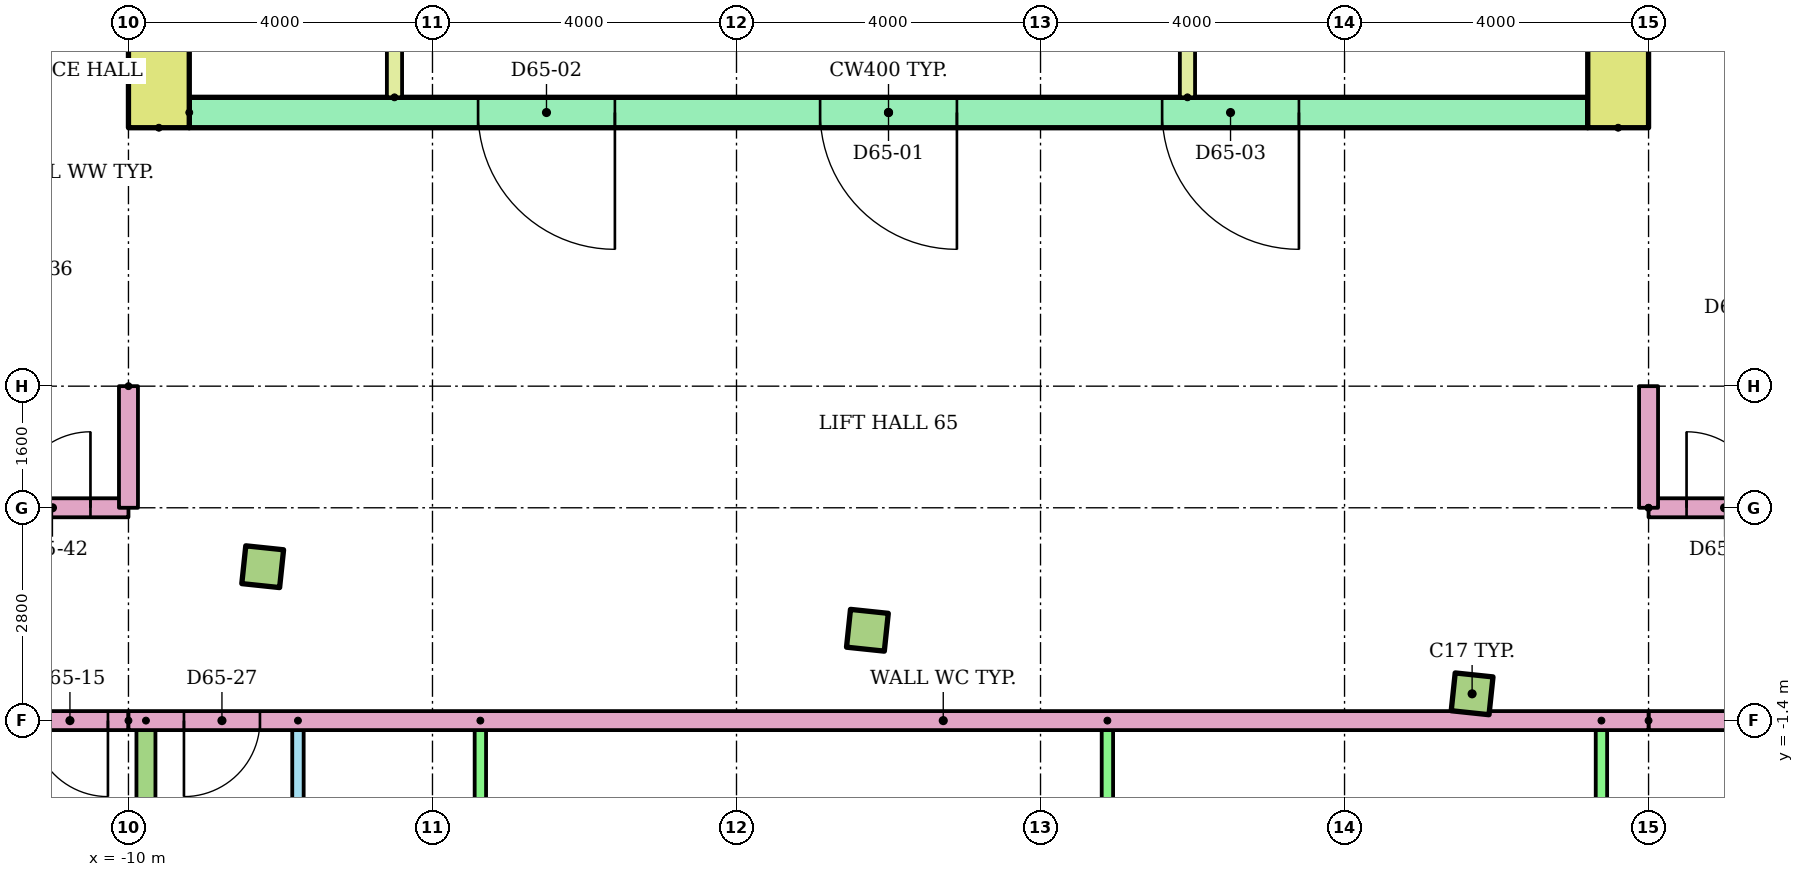
"""IFC4 building model, lengths in metres.
Left out: names, types, materials, properties, quantities, classifications, styles, units other than length and angle.
Written with IfcOpenShell. Run it as: python <this file> out.ifc"""

import sys

from ifc_helpers import new_model, si_unit, direction, frame, frame_2d, origin, origin_2d, place, context, subcontext, project, spatial, rectangle, extrude, element, fill, save


model = new_model("IFC4")
c1 = context("Model", 3, precision=1e-05, world=origin(), true_north=direction((0.0, 1.0)))
c2 = subcontext(c1, "Body", "Model", "MODEL_VIEW")
j1 = project(units=[si_unit("LENGTHUNIT", "METRE"), si_unit("PLANEANGLEUNIT", "RADIAN")], contexts=[c1])
p1 = place(None, origin())
s1 = spatial("IfcSite", under=j1, at=p1, CompositionType="ELEMENT")
p2 = place(p1, origin())
s2 = spatial("IfcBuilding", under=s1, at=p2, CompositionType="ELEMENT")
p3 = place(p2, frame((0.0, 0.0, 253.1)))
s3 = spatial("IfcBuildingStorey", under=s2, at=p3, CompositionType="ELEMENT", Elevation=253.1)
for number, where, z_axis, x_axis in (
    (1, (-8.234, 0.625, 0.0), (0.0, 0.0, 1.0), (0.995, -0.105, 0.0)),
    (2, (-0.278, -0.211, 0.0), (0.0, 0.0, 1.0), (0.995, -0.105, 0.0)),
    (3, (7.678, -1.048, 0.0), (0.0, 0.0, 1.0), (0.995, -0.105, 0.0)),
):
    element("IfcColumn", number, at=place(p3, frame(where, z_axis=z_axis, x_axis=x_axis)), inside=s3, PredefinedType="COLUMN", context=c2, shape_type="SweptSolid", body=[
        extrude(rectangle(XDim=0.5, YDim=0.5, at=origin_2d()), origin(), (0.0, 0.0, 1.0), 3.2),
    ])
for number, where, z_axis, x_axis in (
    (4, (-9.6, 6.4, 0.0), (0.0, 0.0, 1.0), (0.0, 1.0, 0.0)),
    (5, (9.6, 6.4, 0.0), (0.0, 0.0, 1.0), (0.0, 1.0, 0.0)),
):
    element("IfcWall", number, at=place(p3, frame(where, z_axis=z_axis, x_axis=x_axis)), inside=s3, PredefinedType="SHEAR", context=c2, shape_type="SweptSolid", body=[
        extrude(rectangle(XDim=13.6, YDim=0.8, at=frame_2d((6.8, 0.0))), origin(), (0.0, 0.0, 1.0), 2.92),
    ])
p4 = place(p3, frame((-9.2, 6.6, 0.0)))
e6 = element("IfcWall", 6, at=p4, inside=s3, PredefinedType="SHEAR", context=c2, shape_type="SweptSolid", body=[
    extrude(rectangle(XDim=18.4, YDim=0.4, at=frame_2d((9.2, 0.0))), origin(), (0.0, 0.0, 1.0), 2.92),
])
p5 = place(p4, frame((8.3, 0.0, 0.0)))
e7 = element("IfcOpeningElement", 7, at=p5, cuts=e6, PredefinedType="OPENING", context=c2, shape_type="SweptSolid", body=[
    extrude(rectangle(XDim=1.8, YDim=2.1, at=frame_2d((0.9, 1.05))), frame((0.0, 0.21, 0.0), z_axis=(0.0, -1.0, 0.0), x_axis=(1.0, 0.0, 0.0)), (0.0, 0.0, 1.0), 0.42),
])
p6 = place(p4, frame((3.8, 0.0, 0.0)))
e8 = element("IfcOpeningElement", 8, at=p6, cuts=e6, PredefinedType="OPENING", context=c2, shape_type="SweptSolid", body=[
    extrude(rectangle(XDim=1.8, YDim=2.1, at=frame_2d((0.9, 1.05))), frame((0.0, 0.21, 0.0), z_axis=(0.0, -1.0, 0.0), x_axis=(1.0, 0.0, 0.0)), (0.0, 0.0, 1.0), 0.42),
])
p7 = place(p4, frame((12.8, 0.0, 0.0)))
e9 = element("IfcOpeningElement", 9, at=p7, cuts=e6, PredefinedType="OPENING", context=c2, shape_type="SweptSolid", body=[
    extrude(rectangle(XDim=1.8, YDim=2.1, at=frame_2d((0.9, 1.05))), frame((0.0, 0.21, 0.0), z_axis=(0.0, -1.0, 0.0), x_axis=(1.0, 0.0, 0.0)), (0.0, 0.0, 1.0), 0.42),
])
p8 = place(p3, frame((3.933, 6.8, 0.0), z_axis=(0.0, 0.0, 1.0), x_axis=(0.0, 1.0, 0.0)))
e10 = element("IfcWall", 10, at=p8, inside=s3, PredefinedType="PARTITIONING", context=c2, shape_type="SweptSolid", body=[
    extrude(rectangle(XDim=3.3, YDim=0.2, at=frame_2d((1.65, 0.0))), origin(), (0.0, 0.0, 1.0), 2.92),
])
p9 = place(p8, frame((1.1, 0.0, 0.0)))
e11 = element("IfcOpeningElement", 11, at=p9, cuts=e10, PredefinedType="OPENING", context=c2, shape_type="SweptSolid", body=[
    extrude(rectangle(XDim=1.1, YDim=2.1, at=frame_2d((0.55, 1.05))), frame((0.0, 0.11, 0.0), z_axis=(0.0, -1.0, 0.0), x_axis=(1.0, 0.0, 0.0)), (0.0, 0.0, 1.0), 0.22),
])
p10 = place(p3, frame((-6.5, 6.8, 0.0), z_axis=(0.0, 0.0, 1.0), x_axis=(0.0, 1.0, 0.0)))
e12 = element("IfcWall", 12, at=p10, inside=s3, PredefinedType="PARTITIONING", context=c2, shape_type="SweptSolid", body=[
    extrude(rectangle(XDim=3.3, YDim=0.2, at=frame_2d((1.65, 0.0))), origin(), (0.0, 0.0, 1.0), 2.92),
])
p11 = place(p10, frame((1.15, 0.0, 0.0)))
e13 = element("IfcOpeningElement", 13, at=p11, cuts=e12, PredefinedType="OPENING", context=c2, shape_type="SweptSolid", body=[
    extrude(rectangle(XDim=1.0, YDim=2.1, at=frame_2d((0.5, 1.05))), frame((0.0, 0.11, 0.0), z_axis=(0.0, -1.0, 0.0), x_axis=(1.0, 0.0, 0.0)), (0.0, 0.0, 1.0), 0.22),
])
p12 = place(p3, frame((-7.77, -1.4, 0.0), z_axis=(0.0, 0.0, 1.0), x_axis=(0.0, -1.0, 0.0)))
e14 = element("IfcWall", 14, at=p12, inside=s3, PredefinedType="PARTITIONING", context=c2, shape_type="SweptSolid", body=[
    extrude(rectangle(XDim=6.075, YDim=0.15, at=frame_2d((3.037, 0.0))), origin(), (0.0, 0.0, 1.0), 2.4),
])
p13 = place(p12, frame((1.175, 0.0, 0.0)))
e15 = element("IfcOpeningElement", 15, at=p13, cuts=e14, PredefinedType="OPENING", context=c2, shape_type="SweptSolid", body=[
    extrude(rectangle(XDim=0.9, YDim=2.1, at=frame_2d((0.45, 1.05))), frame((0.0, 0.085, 0.0), z_axis=(0.0, -1.0, 0.0), x_axis=(1.0, 0.0, 0.0)), (0.0, 0.0, 1.0), 0.17),
])
p14 = place(p12, frame((4.13, 0.0, 0.0)))
e16 = element("IfcOpeningElement", 16, at=p14, cuts=e14, PredefinedType="OPENING", context=c2, shape_type="SweptSolid", body=[
    extrude(rectangle(XDim=0.8, YDim=2.1, at=frame_2d((0.4, 1.05))), frame((0.0, 0.085, 0.0), z_axis=(0.0, -1.0, 0.0), x_axis=(1.0, 0.0, 0.0)), (0.0, 0.0, 1.0), 0.17),
])
for number, where, z_axis, x_axis in (
    (17, (-5.37, -1.4, 0.0), (0.0, 0.0, 1.0), (0.0, -1.0, 0.0)),
    (18, (2.88, -1.4, 0.0), (0.0, 0.0, 1.0), (0.0, -1.0, 0.0)),
    (19, (9.38, -1.4, 0.0), (0.0, 0.0, 1.0), (0.0, -1.0, 0.0)),
):
    element("IfcWall", number, at=place(p3, frame(where, z_axis=z_axis, x_axis=x_axis)), inside=s3, PredefinedType="PARTITIONING", context=c2, shape_type="SweptSolid", body=[
        extrude(rectangle(XDim=6.075, YDim=0.15, at=frame_2d((3.037, 0.0))), origin(), (0.0, 0.0, 1.0), 2.4),
    ])
p15 = place(p3, frame((-9.77, -1.4, 0.0), z_axis=(0.0, 0.0, 1.0), x_axis=(0.0, -1.0, 0.0)))
e20 = element("IfcWall", 20, at=p15, inside=s3, PredefinedType="PARTITIONING", context=c2, shape_type="SweptSolid", body=[
    extrude(rectangle(XDim=12.504, YDim=0.25, at=frame_2d((6.252, 0.0))), origin(), (0.0, 0.0, 1.0), 2.4),
])
p16 = place(p3, frame((-10.0, -1.4, 0.0), z_axis=(0.0, 0.0, 1.0), x_axis=(-1.0, 0.0, 0.0)))
e21 = element("IfcWall", 21, at=p16, inside=s3, PredefinedType="PARTITIONING", context=c2, shape_type="SweptSolid", body=[
    extrude(rectangle(XDim=13.56, YDim=0.25, at=frame_2d((6.78, 0.0))), origin(), (0.0, 0.0, 1.0), 2.4),
])
p17 = place(p16, frame((0.27, 0.0, 0.0)))
e22 = element("IfcOpeningElement", 22, at=p17, cuts=e21, PredefinedType="OPENING", context=c2, shape_type="SweptSolid", body=[
    extrude(rectangle(XDim=1.0, YDim=2.1, at=frame_2d((0.5, 1.05))), frame((0.0, 0.135, 0.0), z_axis=(0.0, -1.0, 0.0), x_axis=(1.0, 0.0, 0.0)), (0.0, 0.0, 1.0), 0.27),
])
p18 = place(p3, frame((25.0, -1.4, 0.0), z_axis=(0.0, 0.0, 1.0), x_axis=(-1.0, 0.0, 0.0)))
e23 = element("IfcWall", 23, at=p18, inside=s3, PredefinedType="PARTITIONING", context=c2, shape_type="SweptSolid", body=[
    extrude(rectangle(XDim=15.0, YDim=0.25, at=frame_2d((7.5, 0.0))), origin(), (0.0, 0.0, 1.0), 2.4),
])
p19 = place(p18, frame((9.658, 0.0, 0.0)))
e24 = element("IfcOpeningElement", 24, at=p19, cuts=e23, PredefinedType="OPENING", context=c2, shape_type="SweptSolid", body=[
    extrude(rectangle(XDim=0.9, YDim=2.1, at=frame_2d((0.45, 1.05))), frame((0.0, 0.135, 0.0), z_axis=(0.0, -1.0, 0.0), x_axis=(1.0, 0.0, 0.0)), (0.0, 0.0, 1.0), 0.27),
])
p20 = place(p3, frame((-23.265, 1.4, 0.0)))
e25 = element("IfcWall", 25, at=p20, inside=s3, PredefinedType="PARTITIONING", context=c2, shape_type="SweptSolid", body=[
    extrude(rectangle(XDim=13.265, YDim=0.25, at=frame_2d((6.633, 0.0))), origin(), (0.0, 0.0, 1.0), 2.4),
])
p21 = place(p20, frame((11.765, 0.0, 0.0)))
e26 = element("IfcOpeningElement", 26, at=p21, cuts=e25, PredefinedType="OPENING", context=c2, shape_type="SweptSolid", body=[
    extrude(rectangle(XDim=1.0, YDim=2.1, at=frame_2d((0.5, 1.05))), frame((0.0, 0.135, 0.0), z_axis=(0.0, -1.0, 0.0), x_axis=(1.0, 0.0, 0.0)), (0.0, 0.0, 1.0), 0.27),
])
p22 = place(p3, frame((10.0, 1.4, 0.0)))
e27 = element("IfcWall", 27, at=p22, inside=s3, PredefinedType="PARTITIONING", context=c2, shape_type="SweptSolid", body=[
    extrude(rectangle(XDim=15.0, YDim=0.25, at=frame_2d((7.5, 0.0))), origin(), (0.0, 0.0, 1.0), 2.4),
])
p23 = place(p22, frame((0.5, 0.0, 0.0)))
e28 = element("IfcOpeningElement", 28, at=p23, cuts=e27, PredefinedType="OPENING", context=c2, shape_type="SweptSolid", body=[
    extrude(rectangle(XDim=1.0, YDim=2.1, at=frame_2d((0.5, 1.05))), frame((0.0, 0.135, 0.0), z_axis=(0.0, -1.0, 0.0), x_axis=(1.0, 0.0, 0.0)), (0.0, 0.0, 1.0), 0.27),
])
p24 = place(p3, frame((10.0, -1.4, 0.0), z_axis=(0.0, 0.0, 1.0), x_axis=(-1.0, 0.0, 0.0)))
e29 = element("IfcWall", 29, at=p24, inside=s3, PredefinedType="PARTITIONING", context=c2, shape_type="SweptSolid", body=[
    extrude(rectangle(XDim=20.0, YDim=0.25, at=frame_2d((10.0, 0.0))), origin(), (0.0, 0.0, 1.0), 2.4),
])
p25 = place(p24, frame((18.27, 0.0, 0.0)))
e30 = element("IfcOpeningElement", 30, at=p25, cuts=e29, PredefinedType="OPENING", context=c2, shape_type="SweptSolid", body=[
    extrude(rectangle(XDim=1.0, YDim=2.1, at=frame_2d((0.5, 1.05))), frame((0.0, 0.135, 0.0), z_axis=(0.0, -1.0, 0.0), x_axis=(1.0, 0.0, 0.0)), (0.0, 0.0, 1.0), 0.27),
])
for number, where, z_axis, x_axis in (
    (31, (-10.0, 3.0, 0.0), (0.0, 0.0, 1.0), (0.0, -1.0, 0.0)),
    (32, (10.0, 1.4, 0.0), (0.0, 0.0, 1.0), (0.0, 1.0, 0.0)),
):
    element("IfcWall", number, at=place(p3, frame(where, z_axis=z_axis, x_axis=x_axis)), inside=s3, PredefinedType="PARTITIONING", context=c2, shape_type="SweptSolid", body=[
        extrude(rectangle(XDim=1.6, YDim=0.25, at=frame_2d((0.8, 0.0))), origin(), (0.0, 0.0, 1.0), 2.4),
    ])
p26 = place(p5, frame((1.8, 0.0, 0.0), z_axis=(0.0, 0.0, 1.0), x_axis=(-1.0, 0.0, 0.0)))
e33 = element("IfcDoor", 33, at=p26, inside=s3, OperationType="DOUBLE_DOOR_SINGLE_SWING", PredefinedType="DOOR", context=c2, shape_type="SweptSolid", body=[
    extrude(rectangle(XDim=1.8, YDim=2.1, at=frame_2d((0.9, 1.05))), frame((0.0, 0.025, 0.0), z_axis=(0.0, -1.0, 0.0), x_axis=(1.0, 0.0, 0.0)), (0.0, 0.0, 1.0), 0.05),
])
fill(e7, e33)
p27 = place(p6, frame((1.8, 0.0, 0.0), z_axis=(0.0, 0.0, 1.0), x_axis=(-1.0, 0.0, 0.0)))
e34 = element("IfcDoor", 34, at=p27, inside=s3, OperationType="DOUBLE_DOOR_SINGLE_SWING", PredefinedType="DOOR", context=c2, shape_type="SweptSolid", body=[
    extrude(rectangle(XDim=1.8, YDim=2.1, at=frame_2d((0.9, 1.05))), frame((0.0, 0.025, 0.0), z_axis=(0.0, -1.0, 0.0), x_axis=(1.0, 0.0, 0.0)), (0.0, 0.0, 1.0), 0.05),
])
fill(e8, e34)
p28 = place(p7, frame((1.8, 0.0, 0.0), z_axis=(0.0, 0.0, 1.0), x_axis=(-1.0, 0.0, 0.0)))
e35 = element("IfcDoor", 35, at=p28, inside=s3, OperationType="DOUBLE_DOOR_SINGLE_SWING", PredefinedType="DOOR", context=c2, shape_type="SweptSolid", body=[
    extrude(rectangle(XDim=1.8, YDim=2.1, at=frame_2d((0.9, 1.05))), frame((0.0, 0.025, 0.0), z_axis=(0.0, -1.0, 0.0), x_axis=(1.0, 0.0, 0.0)), (0.0, 0.0, 1.0), 0.05),
])
fill(e9, e35)
p29 = place(p17, origin())
e36 = element("IfcDoor", 36, at=p29, inside=s3, OperationType="SINGLE_SWING_LEFT", PredefinedType="DOOR", context=c2, shape_type="SweptSolid", body=[
    extrude(rectangle(XDim=1.0, YDim=2.1, at=frame_2d((0.5, 1.05))), frame((0.0, 0.025, 0.0), z_axis=(0.0, -1.0, 0.0), x_axis=(1.0, 0.0, 0.0)), (0.0, 0.0, 1.0), 0.05),
])
fill(e22, e36)
p30 = place(p25, origin())
e37 = element("IfcDoor", 37, at=p30, inside=s3, OperationType="SINGLE_SWING_RIGHT", PredefinedType="DOOR", context=c2, shape_type="SweptSolid", body=[
    extrude(rectangle(XDim=1.0, YDim=2.1, at=frame_2d((0.5, 1.05))), frame((0.0, 0.025, 0.0), z_axis=(0.0, -1.0, 0.0), x_axis=(1.0, 0.0, 0.0)), (0.0, 0.0, 1.0), 0.05),
])
fill(e30, e37)
p31 = place(p21, origin())
e38 = element("IfcDoor", 38, at=p31, inside=s3, OperationType="SINGLE_SWING_RIGHT", PredefinedType="DOOR", context=c2, shape_type="SweptSolid", body=[
    extrude(rectangle(XDim=1.0, YDim=2.1, at=frame_2d((0.5, 1.05))), frame((0.0, 0.025, 0.0), z_axis=(0.0, -1.0, 0.0), x_axis=(1.0, 0.0, 0.0)), (0.0, 0.0, 1.0), 0.05),
])
fill(e26, e38)
p32 = place(p23, origin())
e39 = element("IfcDoor", 39, at=p32, inside=s3, OperationType="SINGLE_SWING_LEFT", PredefinedType="DOOR", context=c2, shape_type="SweptSolid", body=[
    extrude(rectangle(XDim=1.0, YDim=2.1, at=frame_2d((0.5, 1.05))), frame((0.0, 0.025, 0.0), z_axis=(0.0, -1.0, 0.0), x_axis=(1.0, 0.0, 0.0)), (0.0, 0.0, 1.0), 0.05),
])
fill(e28, e39)
save(model, sys.argv[1])
